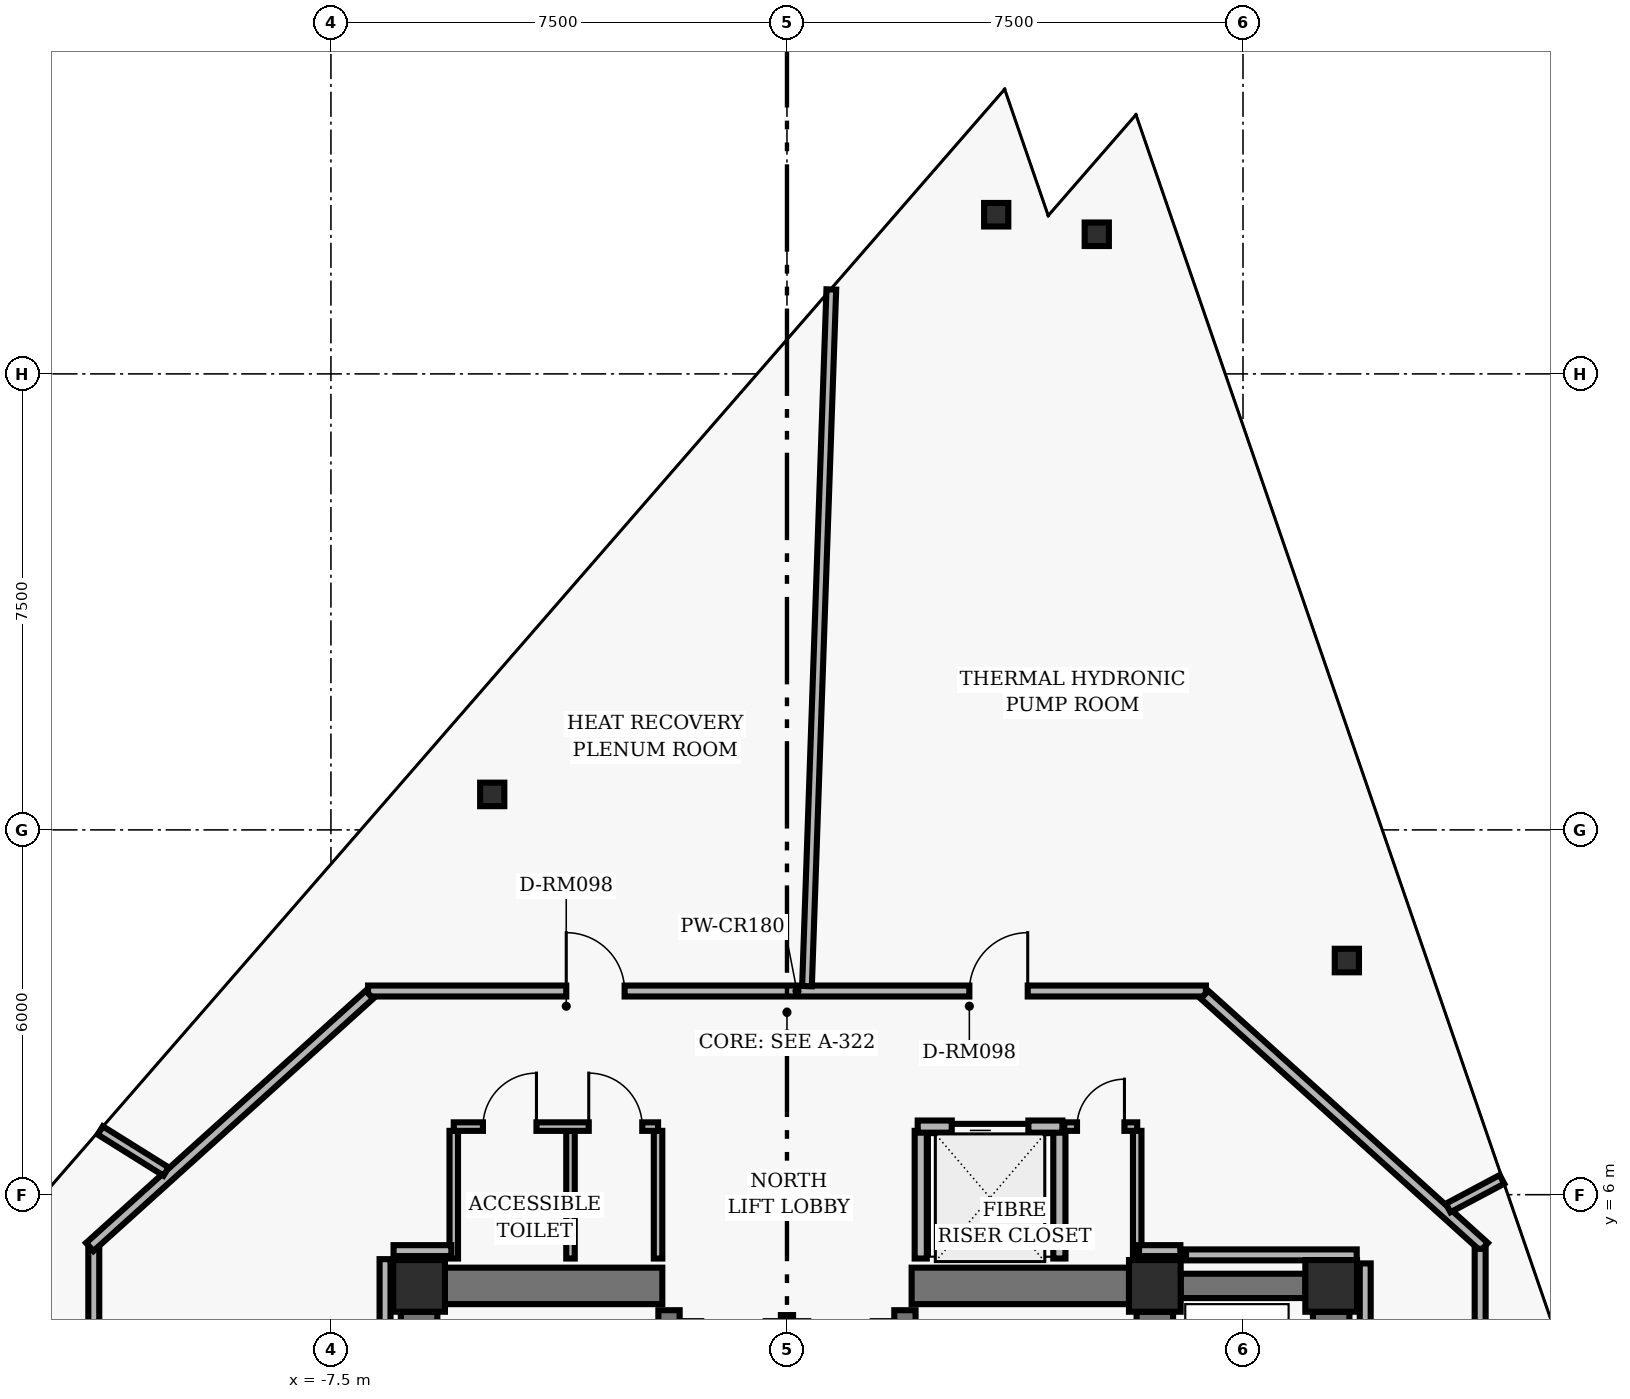
"""IFC4 building model, lengths in metres.
Left out: names, types, materials, properties, quantities, classifications, styles, units other than length and angle.
Written with IfcOpenShell. Run it as: python <this file> out.ifc"""

import sys

from ifc_helpers import new_model, si_unit, direction, frame, frame_2d, origin, origin_2d, place, context, subcontext, project, spatial, rectangle, hollow_rectangle, i_section, extrude, element, fill, save


model = new_model("IFC4")
c1 = context("Model", 3, precision=1e-05, world=origin(), true_north=direction((0.0, 1.0)))
c2 = subcontext(c1, "Body", "Model", "MODEL_VIEW")
j1 = project(units=[si_unit("LENGTHUNIT", "METRE"), si_unit("PLANEANGLEUNIT", "RADIAN")], contexts=[c1])
p1 = place(None, origin())
s1 = spatial("IfcSite", under=j1, at=p1, CompositionType="ELEMENT")
p2 = place(p1, origin())
s2 = spatial("IfcBuilding", under=s1, at=p2, CompositionType="ELEMENT")
p3 = place(p2, frame((0.0, 0.0, 171.52)))
s3 = spatial("IfcBuildingStorey", under=s2, at=p3, CompositionType="ELEMENT", Elevation=171.52)
for number, where, z_axis, x_axis in (
    (1, (-6.05, 4.5, 0.0), (0.0, 0.0, 1.0), (1.0, 0.0, 0.0)),
    (2, (6.05, 4.5, 0.0), (0.0, 0.0, 1.0), (1.0, 0.0, 0.0)),
    (3, (8.95, 4.5, 0.0), (0.0, 0.0, 1.0), (1.0, 0.0, 0.0)),
):
    element("IfcColumn", number, at=place(p3, frame(where, z_axis=z_axis, x_axis=x_axis)), inside=s3, PredefinedType="COLUMN", context=c2, shape_type="SweptSolid", body=[
        extrude(hollow_rectangle(XDim=0.85, YDim=0.85, WallThickness=0.055, InnerFilletRadius=0.02, OuterFilletRadius=0.04, at=origin_2d()), origin(), (0.0, 0.0, 1.0), 3.84),
    ])
for number, where, z_axis, x_axis in (
    (4, (-6.05, 0.425, 0.0), (0.0, 0.0, 1.0), (0.0, 1.0, 0.0)),
    (5, (6.05, 0.425, 0.0), (0.0, 0.0, 1.0), (0.0, 1.0, 0.0)),
):
    element("IfcWall", number, at=place(p3, frame(where, z_axis=z_axis, x_axis=x_axis)), inside=s3, PredefinedType="SHEAR", context=c2, shape_type="SweptSolid", body=[
        extrude(rectangle(XDim=3.65, YDim=0.6, at=frame_2d((1.825, 0.0))), origin(), (0.0, 0.0, 1.0), 3.418),
    ])
for number, where, z_axis, x_axis in (
    (6, (-1.94, -4.1, 0.0), (0.0, 0.0, 1.0), (0.0, 1.0, 0.0)),
    (7, (1.94, -4.1, 0.0), (0.0, 0.0, 1.0), (0.0, 1.0, 0.0)),
):
    element("IfcWall", number, at=place(p3, frame(where, z_axis=z_axis, x_axis=x_axis)), inside=s3, PredefinedType="SHEAR", context=c2, shape_type="SweptSolid", body=[
        extrude(rectangle(XDim=8.2, YDim=0.35, at=frame_2d((4.1, 0.0))), origin(), (0.0, 0.0, 1.0), 3.418),
    ])
for number, where, z_axis, x_axis in (
    (8, (-5.625, 4.5, 0.0), (0.0, 0.0, 1.0), (1.0, 0.0, 0.0)),
    (9, (2.05, 4.5, 0.0), (0.0, 0.0, 1.0), (1.0, 0.0, 0.0)),
):
    element("IfcWall", number, at=place(p3, frame(where, z_axis=z_axis, x_axis=x_axis)), inside=s3, PredefinedType="SHEAR", context=c2, shape_type="SweptSolid", body=[
        extrude(rectangle(XDim=3.575, YDim=0.6, at=frame_2d((1.788, 0.0))), origin(), (0.0, 0.0, 1.0), 3.418),
    ])
p4 = place(p3, frame((8.95, -3.875, 0.0), z_axis=(0.0, 0.0, 1.0), x_axis=(0.0, 1.0, 0.0)))
e10 = element("IfcWall", 10, at=p4, inside=s3, PredefinedType="SHEAR", context=c2, shape_type="SweptSolid", body=[
    extrude(rectangle(XDim=7.95, YDim=0.6, at=frame_2d((3.975, 0.0))), origin(), (0.0, 0.0, 1.0), 3.418),
])
p5 = place(p3, frame((6.475, 4.5, 0.0), z_axis=(0.0, 0.0, 1.0), x_axis=(1.0, 0.0, 0.0)))
e11 = element("IfcWall", 11, at=p5, inside=s3, PredefinedType="SHEAR", context=c2, shape_type="SweptSolid", body=[
    extrude(rectangle(XDim=2.05, YDim=0.4, at=frame_2d((1.025, 0.0))), origin(), (0.0, 0.0, 1.0), 3.418),
])
for number, where, z_axis, x_axis in (
    (12, (9.208, 9.851, 0.0), (0.0, 0.0, 1.0), (1.0, 0.0, 0.0)),
    (13, (5.095, 21.796, 0.0), (0.0, 0.0, 1.0), (1.0, 0.0, 0.0)),
    (14, (3.441, 22.118, 0.0), (0.0, 0.0, 1.0), (1.0, 0.0, 0.0)),
    (15, (-4.847, 12.583, 0.0), (0.0, 0.0, 1.0), (1.0, 0.0, 0.0)),
):
    element("IfcColumn", number, at=place(p3, frame(where, z_axis=z_axis, x_axis=x_axis)), inside=s3, PredefinedType="COLUMN", context=c2, shape_type="SweptSolid", body=[
        extrude(i_section(OverallWidth=0.398, OverallDepth=0.387, WebThickness=0.021, FlangeThickness=0.033, FilletRadius=0.018, at=origin_2d()), origin(), (0.0, 0.0, 1.0), 3.84),
    ])
p6 = place(p3, frame((0.0, 1.25, 0.0), z_axis=(0.0, 0.0, 1.0), x_axis=(0.0, 1.0, 0.0)))
e16 = element("IfcWall", 16, at=p6, inside=s3, PredefinedType="PARTITIONING", context=c2, shape_type="SweptSolid", body=[
    extrude(rectangle(XDim=2.77, YDim=0.2, at=frame_2d((1.385, 0.0))), origin(), (0.0, 0.0, 1.0), 3.393),
])
for number, where, z_axis, x_axis in (
    (17, (2.2, 4.95, 0.0), (0.0, 0.0, 1.0), (0.0, 1.0, 0.0)),
    (18, (4.48, 4.95, 0.0), (0.0, 0.0, 1.0), (0.0, 1.0, 0.0)),
):
    element("IfcWall", number, at=place(p3, frame(where, z_axis=z_axis, x_axis=x_axis)), inside=s3, PredefinedType="PARTITIONING", context=c2, shape_type="SweptSolid", body=[
        extrude(rectangle(XDim=2.1, YDim=0.2, at=frame_2d((1.05, 0.0))), origin(), (0.0, 0.0, 1.0), 3.393),
    ])
p7 = place(p3, frame((2.15, 7.12, 0.0), z_axis=(0.0, 0.0, 1.0), x_axis=(1.0, 0.0, 0.0)))
e19 = element("IfcWall", 19, at=p7, inside=s3, PredefinedType="PARTITIONING", context=c2, shape_type="SweptSolid", body=[
    extrude(rectangle(XDim=2.38, YDim=0.2, at=frame_2d((1.19, 0.0))), origin(), (0.0, 0.0, 1.0), 3.393),
])
p8 = place(p7, frame((0.56, 0.0, 0.0)))
e20 = element("IfcOpeningElement", 20, at=p8, cuts=e19, PredefinedType="OPENING", context=c2, shape_type="SweptSolid", body=[
    extrude(rectangle(XDim=1.26, YDim=2.06, at=frame_2d((0.63, 1.03))), frame((0.0, 0.11, 0.0), z_axis=(0.0, -1.0, 0.0), x_axis=(1.0, 0.0, 0.0)), (0.0, 0.0, 1.0), 0.22),
])
for number, where, z_axis, x_axis in (
    (21, (-5.48, 4.95, 0.0), (0.0, 0.0, 1.0), (0.0, 1.0, 0.0)),
    (22, (-3.56, 4.95, 0.0), (0.0, 0.0, 1.0), (0.0, 1.0, 0.0)),
    (23, (-2.12, 4.95, 0.0), (0.0, 0.0, 1.0), (0.0, 1.0, 0.0)),
):
    element("IfcWall", number, at=place(p3, frame(where, z_axis=z_axis, x_axis=x_axis)), inside=s3, PredefinedType="PARTITIONING", context=c2, shape_type="SweptSolid", body=[
        extrude(rectangle(XDim=2.1, YDim=0.14, at=frame_2d((1.05, 0.0))), origin(), (0.0, 0.0, 1.0), 3.393),
    ])
p9 = place(p3, frame((-5.48, 7.12, 0.0), z_axis=(0.0, 0.0, 1.0), x_axis=(1.0, 0.0, 0.0)))
e24 = element("IfcWall", 24, at=p9, inside=s3, PredefinedType="PARTITIONING", context=c2, shape_type="SweptSolid", body=[
    extrude(rectangle(XDim=3.36, YDim=0.14, at=frame_2d((1.68, 0.0))), origin(), (0.0, 0.0, 1.0), 3.393),
])
p10 = place(p9, frame((0.48, 0.0, 0.0)))
e25 = element("IfcOpeningElement", 25, at=p10, cuts=e24, PredefinedType="OPENING", context=c2, shape_type="SweptSolid", body=[
    extrude(rectangle(XDim=0.88, YDim=2.02, at=frame_2d((0.44, 1.01))), frame((0.0, 0.08, 0.0), z_axis=(0.0, -1.0, 0.0), x_axis=(1.0, 0.0, 0.0)), (0.0, 0.0, 1.0), 0.16),
])
p11 = place(p9, frame((2.22, 0.0, 0.0)))
e26 = element("IfcOpeningElement", 26, at=p11, cuts=e24, PredefinedType="OPENING", context=c2, shape_type="SweptSolid", body=[
    extrude(rectangle(XDim=0.88, YDim=2.02, at=frame_2d((0.44, 1.01))), frame((0.0, 0.08, 0.0), z_axis=(0.0, -1.0, 0.0), x_axis=(1.0, 0.0, 0.0)), (0.0, 0.0, 1.0), 0.16),
])
p12 = place(p3, frame((5.76, 4.95, 0.0), z_axis=(0.0, 0.0, 1.0), x_axis=(0.0, 1.0, 0.0)))
e27 = element("IfcWall", 27, at=p12, inside=s3, PredefinedType="PARTITIONING", context=c2, shape_type="SweptSolid", body=[
    extrude(rectangle(XDim=2.1, YDim=0.14, at=frame_2d((1.05, 0.0))), origin(), (0.0, 0.0, 1.0), 3.393),
])
p13 = place(p3, frame((4.56, 7.12, 0.0), z_axis=(0.0, 0.0, 1.0), x_axis=(1.0, 0.0, 0.0)))
e28 = element("IfcWall", 28, at=p13, inside=s3, PredefinedType="PARTITIONING", context=c2, shape_type="SweptSolid", body=[
    extrude(rectangle(XDim=1.2, YDim=0.14, at=frame_2d((0.6, 0.0))), origin(), (0.0, 0.0, 1.0), 3.393),
])
p14 = place(p13, frame((0.21, 0.0, 0.0)))
e29 = element("IfcOpeningElement", 29, at=p14, cuts=e28, PredefinedType="OPENING", context=c2, shape_type="SweptSolid", body=[
    extrude(rectangle(XDim=0.78, YDim=2.01, at=frame_2d((0.39, 1.005))), frame((0.0, 0.08, 0.0), z_axis=(0.0, -1.0, 0.0), x_axis=(1.0, 0.0, 0.0)), (0.0, 0.0, 1.0), 0.16),
])
p15 = place(p3, frame((-6.89, 9.35, 0.0), z_axis=(0.0, 0.0, 1.0), x_axis=(1.0, 0.0, 0.0)))
e30 = element("IfcWall", 30, at=p15, inside=s3, PredefinedType="PARTITIONING", context=c2, shape_type="SweptSolid", body=[
    extrude(rectangle(XDim=13.78, YDim=0.18, at=frame_2d((6.89, 0.0))), origin(), (0.0, 0.0, 1.0), 3.393),
])
p16 = place(p15, frame((9.889, 0.0, 0.0)))
e31 = element("IfcOpeningElement", 31, at=p16, cuts=e30, PredefinedType="OPENING", context=c2, shape_type="SweptSolid", body=[
    extrude(rectangle(XDim=0.96, YDim=2.02, at=frame_2d((0.48, 1.01))), frame((0.0, 0.1, 0.0), z_axis=(0.0, -1.0, 0.0), x_axis=(1.0, 0.0, 0.0)), (0.0, 0.0, 1.0), 0.2),
])
p17 = place(p15, frame((3.26, 0.0, 0.0)))
e32 = element("IfcOpeningElement", 32, at=p17, cuts=e30, PredefinedType="OPENING", context=c2, shape_type="SweptSolid", body=[
    extrude(rectangle(XDim=0.96, YDim=2.02, at=frame_2d((0.48, 1.01))), frame((0.0, 0.1, 0.0), z_axis=(0.0, -1.0, 0.0), x_axis=(1.0, 0.0, 0.0)), (0.0, 0.0, 1.0), 0.2),
])
p18 = place(p3, frame((6.867, 9.29, 0.0), z_axis=(0.0, 0.0, 1.0), x_axis=(0.742486327971, -0.669861219042, 0.0)))
e33 = element("IfcWall", 33, at=p18, inside=s3, PredefinedType="PARTITIONING", context=c2, shape_type="SweptSolid", body=[
    extrude(rectangle(XDim=6.196, YDim=0.18, at=frame_2d((3.098, 0.0))), origin(), (0.0, 0.0, 1.0), 3.393),
])
p19 = place(p3, frame((11.4, 5.11, 0.0), z_axis=(0.0, 0.0, 1.0), x_axis=(0.0, -1.0, 0.0)))
e34 = element("IfcWall", 34, at=p19, inside=s3, PredefinedType="PARTITIONING", context=c2, shape_type="SweptSolid", body=[
    extrude(rectangle(XDim=10.22, YDim=0.18, at=frame_2d((5.11, 0.0))), origin(), (0.0, 0.0, 1.0), 2.907),
])
p20 = place(p3, frame((-11.4, -5.11, 0.0), z_axis=(0.0, 0.0, 1.0), x_axis=(0.0, 1.0, 0.0)))
e35 = element("IfcWall", 35, at=p20, inside=s3, PredefinedType="PARTITIONING", context=c2, shape_type="SweptSolid", body=[
    extrude(rectangle(XDim=10.22, YDim=0.18, at=frame_2d((5.11, 0.0))), origin(), (0.0, 0.0, 1.0), 3.393),
])
p21 = place(p20, frame((4.63, 0.0, 0.0)))
e36 = element("IfcOpeningElement", 36, at=p21, cuts=e35, PredefinedType="OPENING", context=c2, shape_type="SweptSolid", body=[
    extrude(rectangle(XDim=0.96, YDim=2.02, at=frame_2d((0.48, 1.01))), frame((0.0, 0.1, 0.0), z_axis=(0.0, -1.0, 0.0), x_axis=(1.0, 0.0, 0.0)), (0.0, 0.0, 1.0), 0.2),
])
p22 = place(p3, frame((-11.467, 5.14, 0.0), z_axis=(0.0, 0.0, 1.0), x_axis=(0.742486327971, 0.669861219042, 0.0)))
e37 = element("IfcWall", 37, at=p22, inside=s3, PredefinedType="PARTITIONING", context=c2, shape_type="SweptSolid", body=[
    extrude(rectangle(XDim=6.196, YDim=0.18, at=frame_2d((3.098, 0.0))), origin(), (0.0, 0.0, 1.0), 2.365),
])
p23 = place(p3, frame((-6.61, 4.94, 0.0), z_axis=(0.0, 0.0, 1.0), x_axis=(0.0, -1.0, 0.0)))
e38 = element("IfcWall", 38, at=p23, inside=s3, PredefinedType="PARTITIONING", context=c2, shape_type="SweptSolid", body=[
    extrude(rectangle(XDim=9.46, YDim=0.18, at=frame_2d((4.73, 0.0))), origin(), (0.0, 0.0, 1.0), 3.393),
])
p24 = place(p3, frame((9.51, -4.87, 0.0), z_axis=(0.0, 0.0, 1.0), x_axis=(0.0, 1.0, 0.0)))
e39 = element("IfcWall", 39, at=p24, inside=s3, PredefinedType="PARTITIONING", context=c2, shape_type="SweptSolid", body=[
    extrude(rectangle(XDim=9.74, YDim=0.18, at=frame_2d((4.87, 0.0))), origin(), (0.0, 0.0, 1.0), 2.907),
])
p25 = place(p3, frame((9.37, 5.01, 0.0), z_axis=(0.0, 0.0, 1.0), x_axis=(-1.0, 0.0, 0.0)))
e40 = element("IfcWall", 40, at=p25, inside=s3, PredefinedType="PARTITIONING", context=c2, shape_type="SweptSolid", body=[
    extrude(rectangle(XDim=2.808, YDim=0.18, at=frame_2d((1.404, 0.0))), origin(), (0.0, 0.0, 1.0), 3.393),
])
p26 = place(p3, frame((6.47, 5.08, 0.0), z_axis=(0.0, 0.0, 1.0), x_axis=(-1.0, 0.0, 0.0)))
e41 = element("IfcWall", 41, at=p26, inside=s3, PredefinedType="PARTITIONING", context=c2, shape_type="SweptSolid", body=[
    extrude(rectangle(XDim=0.68, YDim=0.18, at=frame_2d((0.34, 0.0))), origin(), (0.0, 0.0, 1.0), 3.393),
])
p27 = place(p3, frame((-5.52, 5.08, 0.0), z_axis=(0.0, 0.0, 1.0), x_axis=(-1.0, 0.0, 0.0)))
e42 = element("IfcWall", 42, at=p27, inside=s3, PredefinedType="PARTITIONING", context=c2, shape_type="SweptSolid", body=[
    extrude(rectangle(XDim=0.95, YDim=0.18, at=frame_2d((0.475, 0.0))), origin(), (0.0, 0.0, 1.0), 3.393),
])
p28 = place(p3, frame((10.874, 5.782, 0.0), z_axis=(0.0, 0.0, 1.0), x_axis=(0.882986309888, 0.4693987394, 0.0)))
e43 = element("IfcWall", 43, at=p28, inside=s3, PredefinedType="PARTITIONING", context=c2, shape_type="SweptSolid", body=[
    extrude(rectangle(XDim=1.002, YDim=0.16, at=frame_2d((0.501, 0.0))), origin(), (0.0, 0.0, 1.0), 3.393),
])
p29 = place(p3, frame((0.329, 9.43, 0.0), z_axis=(0.0, 0.0, 1.0), x_axis=(0.034899362377, 0.99939083171, 0.0)))
e44 = element("IfcWall", 44, at=p29, inside=s3, PredefinedType="PARTITIONING", context=c2, shape_type="SweptSolid", body=[
    extrude(rectangle(XDim=11.466, YDim=0.16, at=frame_2d((5.733, 0.0))), origin(), (0.0, 0.0, 1.0), 3.393),
])
p30 = place(p3, frame((-10.211, 6.381, 0.0), z_axis=(0.0, 0.0, 1.0), x_axis=(-0.848127172329, 0.529792694888, 0.0)))
e45 = element("IfcWall", 45, at=p30, inside=s3, PredefinedType="PARTITIONING", context=c2, shape_type="SweptSolid", body=[
    extrude(rectangle(XDim=1.277, YDim=0.16, at=frame_2d((0.638, 0.0))), origin(), (0.0, 0.0, 1.0), 3.393),
])
p31 = place(p8, origin())
e46 = element("IfcDoor", 46, at=p31, inside=s3, OperationType="SLIDING_TO_LEFT", PredefinedType="DOOR", context=c2, shape_type="SweptSolid", body=[
    extrude(rectangle(XDim=1.26, YDim=2.06, at=frame_2d((0.63, 1.03))), frame((0.0, 0.025, 0.0), z_axis=(0.0, -1.0, 0.0), x_axis=(1.0, 0.0, 0.0)), (0.0, 0.0, 1.0), 0.05),
])
fill(e20, e46)
p32 = place(p10, origin())
e47 = element("IfcDoor", 47, at=p32, inside=s3, OperationType="SINGLE_SWING_RIGHT", PredefinedType="DOOR", context=c2, shape_type="SweptSolid", body=[
    extrude(rectangle(XDim=0.88, YDim=2.02, at=frame_2d((0.44, 1.01))), frame((0.0, 0.025, 0.0), z_axis=(0.0, -1.0, 0.0), x_axis=(1.0, 0.0, 0.0)), (0.0, 0.0, 1.0), 0.05),
])
fill(e25, e47)
p33 = place(p11, origin())
e48 = element("IfcDoor", 48, at=p33, inside=s3, OperationType="SINGLE_SWING_LEFT", PredefinedType="DOOR", context=c2, shape_type="SweptSolid", body=[
    extrude(rectangle(XDim=0.88, YDim=2.02, at=frame_2d((0.44, 1.01))), frame((0.0, 0.025, 0.0), z_axis=(0.0, -1.0, 0.0), x_axis=(1.0, 0.0, 0.0)), (0.0, 0.0, 1.0), 0.05),
])
fill(e26, e48)
p34 = place(p14, origin())
e49 = element("IfcDoor", 49, at=p34, inside=s3, OperationType="SINGLE_SWING_RIGHT", PredefinedType="DOOR", context=c2, shape_type="SweptSolid", body=[
    extrude(rectangle(XDim=0.78, YDim=2.01, at=frame_2d((0.39, 1.005))), frame((0.0, 0.025, 0.0), z_axis=(0.0, -1.0, 0.0), x_axis=(1.0, 0.0, 0.0)), (0.0, 0.0, 1.0), 0.05),
])
fill(e29, e49)
p35 = place(p16, origin())
e50 = element("IfcDoor", 50, at=p35, inside=s3, OperationType="SINGLE_SWING_RIGHT", PredefinedType="DOOR", context=c2, shape_type="SweptSolid", body=[
    extrude(rectangle(XDim=0.96, YDim=2.02, at=frame_2d((0.48, 1.01))), frame((0.0, 0.025, 0.0), z_axis=(0.0, -1.0, 0.0), x_axis=(1.0, 0.0, 0.0)), (0.0, 0.0, 1.0), 0.05),
])
fill(e31, e50)
p36 = place(p17, origin())
e51 = element("IfcDoor", 51, at=p36, inside=s3, OperationType="SINGLE_SWING_LEFT", PredefinedType="DOOR", context=c2, shape_type="SweptSolid", body=[
    extrude(rectangle(XDim=0.96, YDim=2.02, at=frame_2d((0.48, 1.01))), frame((0.0, 0.025, 0.0), z_axis=(0.0, -1.0, 0.0), x_axis=(1.0, 0.0, 0.0)), (0.0, 0.0, 1.0), 0.05),
])
fill(e32, e51)
save(model, sys.argv[1])
